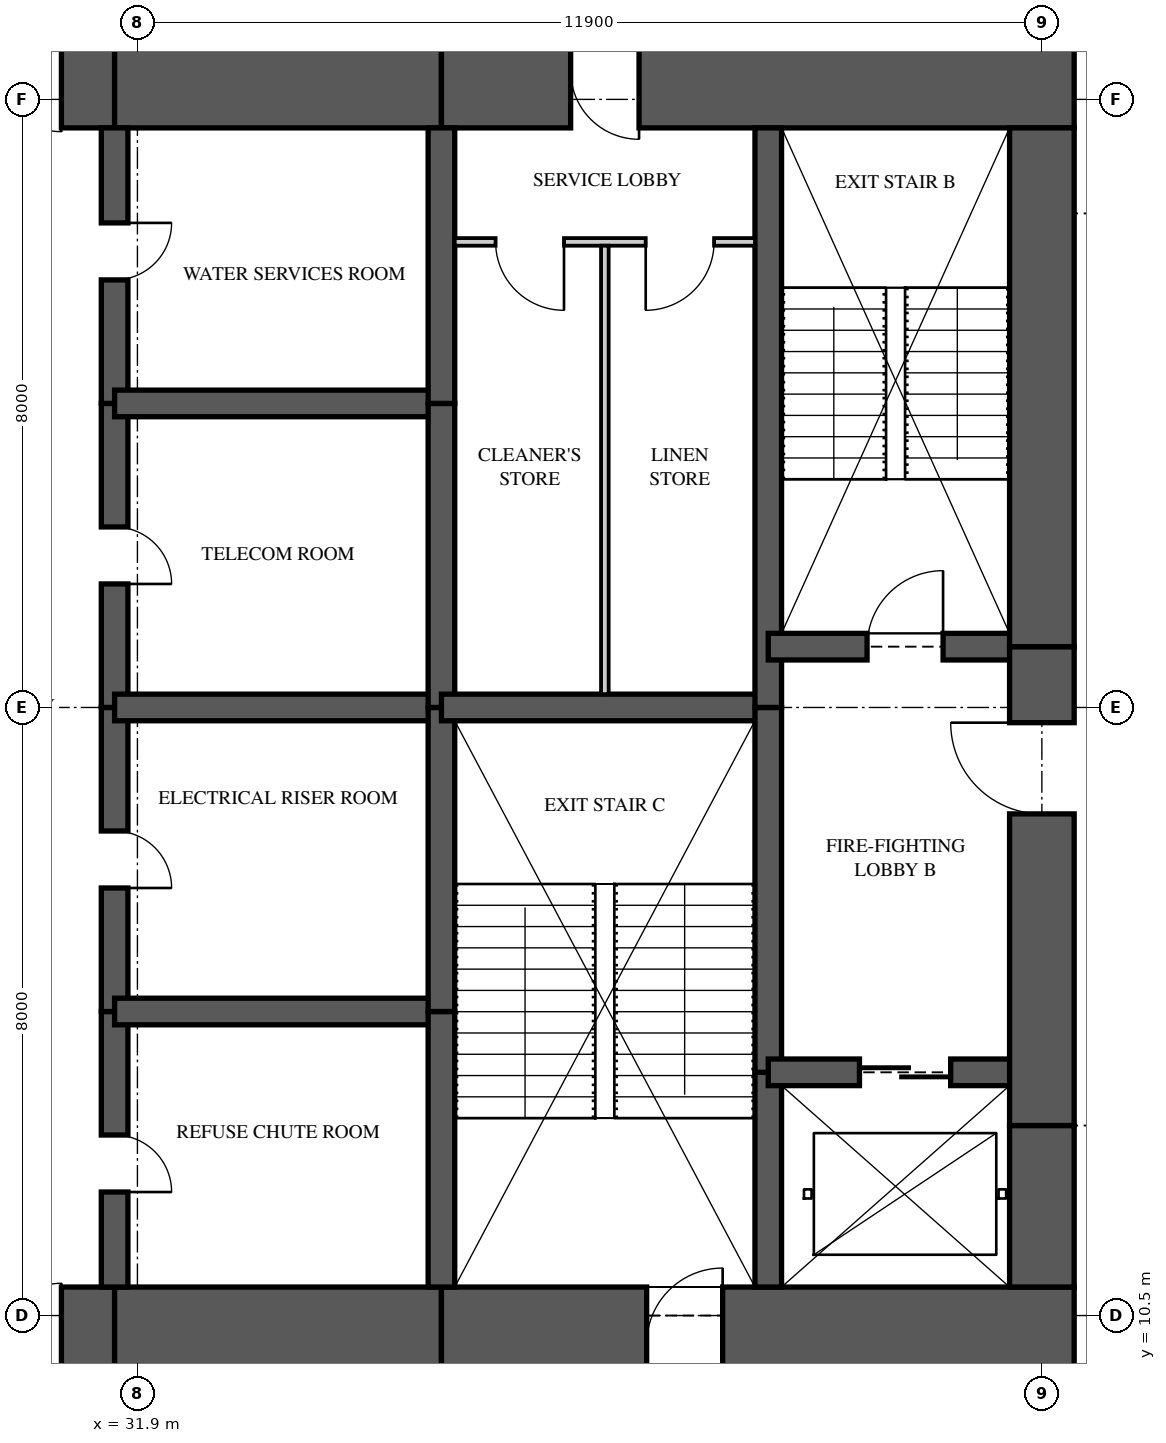
"""IFC4 building model, lengths in metres.
Left out: names, types, materials, properties, quantities, classifications, styles, units other than length and angle.
Written with IfcOpenShell. Run it as: python <this file> out.ifc"""

import sys

from ifc_helpers import new_model, si_unit, direction, frame, frame_2d, origin, place, context, subcontext, project, spatial, rectangle, extrude, element, fill, save


model = new_model("IFC4")
c1 = context("Model", 3, precision=1e-05, world=origin(), true_north=direction((0.0, 1.0)))
c2 = subcontext(c1, "Body", "Model", "MODEL_VIEW")
j1 = project(units=[si_unit("LENGTHUNIT", "METRE"), si_unit("PLANEANGLEUNIT", "RADIAN")], contexts=[c1])
p1 = place(None, origin())
s1 = spatial("IfcSite", under=j1, at=p1, CompositionType="ELEMENT")
p2 = place(p1, origin())
s2 = spatial("IfcBuilding", under=s1, at=p2, CompositionType="ELEMENT")
p3 = place(p2, frame((0.0, 0.0, 91.45)))
s3 = spatial("IfcBuildingStorey", under=s2, at=p3, CompositionType="ELEMENT", Elevation=91.45)
p4 = place(p3, frame((26.0, 10.125, 0.0), z_axis=(0.0, 0.0, 1.0), x_axis=(1.0, 0.0, 0.0)))
e1 = element("IfcWall", 1, at=p4, inside=s3, PredefinedType="SHEAR", context=c2, shape_type="SweptSolid", body=[
    extrude(rectangle(XDim=5.6, YDim=1.5, at=frame_2d((2.8, 0.0))), origin(), (0.0, 0.0, 1.0), 3.35),
])
p5 = place(p4, frame((3.3, 0.0, 0.0)))
e2 = element("IfcOpeningElement", 2, at=p5, cuts=e1, PredefinedType="OPENING", context=c2, shape_type="SweptSolid", body=[
    extrude(rectangle(XDim=1.6, YDim=2.1, at=frame_2d((0.8, 1.05))), frame((0.0, 0.76, 0.0), z_axis=(0.0, -1.0, 0.0), x_axis=(1.0, 0.0, 0.0)), (0.0, 0.0, 1.0), 1.52),
])
p6 = place(p3, frame((31.6, 10.125, 0.0), z_axis=(0.0, 0.0, 1.0), x_axis=(1.0, 0.0, 0.0)))
e3 = element("IfcWall", 3, at=p6, inside=s3, PredefinedType="SHEAR", context=c2, shape_type="SweptSolid", body=[
    extrude(rectangle(XDim=4.3, YDim=1.5, at=frame_2d((2.15, 0.0))), origin(), (0.0, 0.0, 1.0), 3.35),
])
p7 = place(p3, frame((35.9, 10.125, 0.0), z_axis=(0.0, 0.0, 1.0), x_axis=(1.0, 0.0, 0.0)))
e4 = element("IfcWall", 4, at=p7, inside=s3, PredefinedType="SHEAR", context=c2, shape_type="SweptSolid", body=[
    extrude(rectangle(XDim=8.325, YDim=1.5, at=frame_2d((4.163, 0.0))), origin(), (0.0, 0.0, 1.0), 3.35),
])
p8 = place(p7, frame((2.7, 0.0, 0.0)))
e5 = element("IfcOpeningElement", 5, at=p8, cuts=e4, PredefinedType="OPENING", context=c2, shape_type="SweptSolid", body=[
    extrude(rectangle(XDim=1.0, YDim=2.1, at=frame_2d((0.5, 1.05))), frame((0.0, 0.76, 0.0), z_axis=(0.0, -1.0, 0.0), x_axis=(1.0, 0.0, 0.0)), (0.0, 0.0, 1.0), 1.52),
])
p9 = place(p3, frame((44.225, 26.875, 0.0), z_axis=(0.0, 0.0, 1.0), x_axis=(-1.0, 0.0, 0.0)))
e6 = element("IfcWall", 6, at=p9, inside=s3, PredefinedType="SHEAR", context=c2, shape_type="SweptSolid", body=[
    extrude(rectangle(XDim=8.325, YDim=1.5, at=frame_2d((4.163, 0.0))), origin(), (0.0, 0.0, 1.0), 3.35),
])
p10 = place(p9, frame((5.725, 0.0, 0.0)))
e7 = element("IfcOpeningElement", 7, at=p10, cuts=e6, PredefinedType="OPENING", context=c2, shape_type="SweptSolid", body=[
    extrude(rectangle(XDim=0.9, YDim=2.1, at=frame_2d((0.45, 1.05))), frame((0.0, 0.76, 0.0), z_axis=(0.0, -1.0, 0.0), x_axis=(1.0, 0.0, 0.0)), (0.0, 0.0, 1.0), 1.52),
])
p11 = place(p3, frame((35.9, 26.875, 0.0), z_axis=(0.0, 0.0, 1.0), x_axis=(-1.0, 0.0, 0.0)))
e8 = element("IfcWall", 8, at=p11, inside=s3, PredefinedType="SHEAR", context=c2, shape_type="SweptSolid", body=[
    extrude(rectangle(XDim=4.3, YDim=1.5, at=frame_2d((2.15, 0.0))), origin(), (0.0, 0.0, 1.0), 3.35),
])
p12 = place(p3, frame((31.6, 26.875, 0.0), z_axis=(0.0, 0.0, 1.0), x_axis=(-1.0, 0.0, 0.0)))
e9 = element("IfcWall", 9, at=p12, inside=s3, PredefinedType="SHEAR", context=c2, shape_type="SweptSolid", body=[
    extrude(rectangle(XDim=5.6, YDim=1.5, at=frame_2d((2.8, 0.0))), origin(), (0.0, 0.0, 1.0), 3.35),
])
p13 = place(p12, frame((0.7, 0.0, 0.0)))
e10 = element("IfcOpeningElement", 10, at=p13, cuts=e9, PredefinedType="OPENING", context=c2, shape_type="SweptSolid", body=[
    extrude(rectangle(XDim=1.6, YDim=2.1, at=frame_2d((0.8, 1.05))), frame((0.0, 0.76, 0.0), z_axis=(0.0, -1.0, 0.0), x_axis=(1.0, 0.0, 0.0)), (0.0, 0.0, 1.0), 1.52),
])
p14 = place(p3, frame((43.8, 10.875, 0.0), z_axis=(0.0, 0.0, 1.0), x_axis=(0.0, 1.0, 0.0)))
e11 = element("IfcWall", 11, at=p14, inside=s3, PredefinedType="SHEAR", context=c2, shape_type="SweptSolid", body=[
    extrude(rectangle(XDim=2.125, YDim=0.85, at=frame_2d((1.062, 0.0))), origin(), (0.0, 0.0, 1.0), 3.35),
])
p15 = place(p3, frame((43.8, 13.0, 0.0), z_axis=(0.0, 0.0, 1.0), x_axis=(0.0, 1.0, 0.0)))
e12 = element("IfcWall", 12, at=p15, inside=s3, PredefinedType="SHEAR", context=c2, shape_type="SweptSolid", body=[
    extrude(rectangle(XDim=6.3, YDim=0.85, at=frame_2d((3.15, 0.0))), origin(), (0.0, 0.0, 1.0), 3.35),
])
p16 = place(p15, frame((4.1, 0.0, 0.0)))
e13 = element("IfcOpeningElement", 13, at=p16, cuts=e12, PredefinedType="OPENING", context=c2, shape_type="SweptSolid", body=[
    extrude(rectangle(XDim=1.2, YDim=2.2, at=frame_2d((0.6, 1.1))), frame((0.0, 0.435, 0.0), z_axis=(0.0, -1.0, 0.0), x_axis=(1.0, 0.0, 0.0)), (0.0, 0.0, 1.0), 0.87),
])
p17 = place(p3, frame((43.8, 19.3, 0.0), z_axis=(0.0, 0.0, 1.0), x_axis=(0.0, 1.0, 0.0)))
e14 = element("IfcWall", 14, at=p17, inside=s3, PredefinedType="SHEAR", context=c2, shape_type="SweptSolid", body=[
    extrude(rectangle(XDim=6.825, YDim=0.85, at=frame_2d((3.413, 0.0))), origin(), (0.0, 0.0, 1.0), 3.35),
])
p18 = place(p3, frame((31.6, 10.875, 0.0), z_axis=(0.0, 0.0, 1.0), x_axis=(0.0, 1.0, 0.0)))
e15 = element("IfcWall", 15, at=p18, inside=s3, PredefinedType="SHEAR", context=c2, shape_type="SweptSolid", body=[
    extrude(rectangle(XDim=3.625, YDim=0.35, at=frame_2d((1.812, 0.0))), origin(), (0.0, 0.0, 1.0), 3.35),
])
p19 = place(p18, frame((1.25, 0.0, 0.0)))
e16 = element("IfcOpeningElement", 16, at=p19, cuts=e15, PredefinedType="OPENING", context=c2, shape_type="SweptSolid", body=[
    extrude(rectangle(XDim=0.75, YDim=2.1, at=frame_2d((0.375, 1.05))), frame((0.0, 0.185, 0.0), z_axis=(0.0, -1.0, 0.0), x_axis=(1.0, 0.0, 0.0)), (0.0, 0.0, 1.0), 0.37),
])
p20 = place(p3, frame((31.6, 14.5, 0.0), z_axis=(0.0, 0.0, 1.0), x_axis=(0.0, 1.0, 0.0)))
e17 = element("IfcWall", 17, at=p20, inside=s3, PredefinedType="SHEAR", context=c2, shape_type="SweptSolid", body=[
    extrude(rectangle(XDim=4.0, YDim=0.35, at=frame_2d((2.0, 0.0))), origin(), (0.0, 0.0, 1.0), 3.35),
])
p21 = place(p20, frame((1.625, 0.0, 0.0)))
e18 = element("IfcOpeningElement", 18, at=p21, cuts=e17, PredefinedType="OPENING", context=c2, shape_type="SweptSolid", body=[
    extrude(rectangle(XDim=0.75, YDim=2.1, at=frame_2d((0.375, 1.05))), frame((0.0, 0.185, 0.0), z_axis=(0.0, -1.0, 0.0), x_axis=(1.0, 0.0, 0.0)), (0.0, 0.0, 1.0), 0.37),
])
p22 = place(p3, frame((31.6, 18.5, 0.0), z_axis=(0.0, 0.0, 1.0), x_axis=(0.0, 1.0, 0.0)))
e19 = element("IfcWall", 19, at=p22, inside=s3, PredefinedType="SHEAR", context=c2, shape_type="SweptSolid", body=[
    extrude(rectangle(XDim=4.0, YDim=0.35, at=frame_2d((2.0, 0.0))), origin(), (0.0, 0.0, 1.0), 3.35),
])
p23 = place(p22, frame((1.625, 0.0, 0.0)))
e20 = element("IfcOpeningElement", 20, at=p23, cuts=e19, PredefinedType="OPENING", context=c2, shape_type="SweptSolid", body=[
    extrude(rectangle(XDim=0.75, YDim=2.1, at=frame_2d((0.375, 1.05))), frame((0.0, 0.185, 0.0), z_axis=(0.0, -1.0, 0.0), x_axis=(1.0, 0.0, 0.0)), (0.0, 0.0, 1.0), 0.37),
])
p24 = place(p3, frame((31.6, 22.5, 0.0), z_axis=(0.0, 0.0, 1.0), x_axis=(0.0, 1.0, 0.0)))
e21 = element("IfcWall", 21, at=p24, inside=s3, PredefinedType="SHEAR", context=c2, shape_type="SweptSolid", body=[
    extrude(rectangle(XDim=3.625, YDim=0.35, at=frame_2d((1.812, 0.0))), origin(), (0.0, 0.0, 1.0), 3.35),
])
p25 = place(p24, frame((1.625, 0.0, 0.0)))
e22 = element("IfcOpeningElement", 22, at=p25, cuts=e21, PredefinedType="OPENING", context=c2, shape_type="SweptSolid", body=[
    extrude(rectangle(XDim=0.75, YDim=2.1, at=frame_2d((0.375, 1.05))), frame((0.0, 0.185, 0.0), z_axis=(0.0, -1.0, 0.0), x_axis=(1.0, 0.0, 0.0)), (0.0, 0.0, 1.0), 0.37),
])
p26 = place(p3, frame((35.9, 10.875, 0.0), z_axis=(0.0, 0.0, 1.0), x_axis=(0.0, 1.0, 0.0)))
e23 = element("IfcWall", 23, at=p26, inside=s3, PredefinedType="SHEAR", context=c2, shape_type="SweptSolid", body=[
    extrude(rectangle(XDim=3.625, YDim=0.35, at=frame_2d((1.812, 0.0))), origin(), (0.0, 0.0, 1.0), 3.35),
])
for number, where, z_axis, x_axis in (
    (24, (35.9, 14.5, 0.0), (0.0, 0.0, 1.0), (0.0, 1.0, 0.0)),
    (25, (35.9, 18.5, 0.0), (0.0, 0.0, 1.0), (0.0, 1.0, 0.0)),
):
    element("IfcWall", number, at=place(p3, frame(where, z_axis=z_axis, x_axis=x_axis)), inside=s3, PredefinedType="SHEAR", context=c2, shape_type="SweptSolid", body=[
        extrude(rectangle(XDim=4.0, YDim=0.35, at=frame_2d((2.0, 0.0))), origin(), (0.0, 0.0, 1.0), 3.35),
    ])
p27 = place(p3, frame((35.9, 22.5, 0.0), z_axis=(0.0, 0.0, 1.0), x_axis=(0.0, 1.0, 0.0)))
e26 = element("IfcWall", 26, at=p27, inside=s3, PredefinedType="SHEAR", context=c2, shape_type="SweptSolid", body=[
    extrude(rectangle(XDim=3.625, YDim=0.35, at=frame_2d((1.812, 0.0))), origin(), (0.0, 0.0, 1.0), 3.35),
])
p28 = place(p3, frame((40.2, 10.875, 0.0), z_axis=(0.0, 0.0, 1.0), x_axis=(0.0, 1.0, 0.0)))
e27 = element("IfcWall", 27, at=p28, inside=s3, PredefinedType="SHEAR", context=c2, shape_type="SweptSolid", body=[
    extrude(rectangle(XDim=2.825, YDim=0.35, at=frame_2d((1.413, 0.0))), origin(), (0.0, 0.0, 1.0), 3.35),
])
p29 = place(p3, frame((40.2, 13.7, 0.0), z_axis=(0.0, 0.0, 1.0), x_axis=(0.0, 1.0, 0.0)))
e28 = element("IfcWall", 28, at=p29, inside=s3, PredefinedType="SHEAR", context=c2, shape_type="SweptSolid", body=[
    extrude(rectangle(XDim=4.8, YDim=0.35, at=frame_2d((2.4, 0.0))), origin(), (0.0, 0.0, 1.0), 3.35),
])
p30 = place(p3, frame((40.2, 18.5, 0.0), z_axis=(0.0, 0.0, 1.0), x_axis=(0.0, 1.0, 0.0)))
e29 = element("IfcWall", 29, at=p30, inside=s3, PredefinedType="SHEAR", context=c2, shape_type="SweptSolid", body=[
    extrude(rectangle(XDim=7.625, YDim=0.35, at=frame_2d((3.812, 0.0))), origin(), (0.0, 0.0, 1.0), 3.35),
])
for number, where, z_axis, x_axis in (
    (30, (31.6, 14.5, 0.0), (0.0, 0.0, 1.0), (1.0, 0.0, 0.0)),
    (31, (31.6, 18.5, 0.0), (0.0, 0.0, 1.0), (1.0, 0.0, 0.0)),
    (32, (31.6, 22.5, 0.0), (0.0, 0.0, 1.0), (1.0, 0.0, 0.0)),
):
    element("IfcWall", number, at=place(p3, frame(where, z_axis=z_axis, x_axis=x_axis)), inside=s3, PredefinedType="SHEAR", context=c2, shape_type="SweptSolid", body=[
        extrude(rectangle(XDim=4.3, YDim=0.35, at=frame_2d((2.15, 0.0))), origin(), (0.0, 0.0, 1.0), 3.35),
    ])
p31 = place(p3, frame((35.9, 18.5, 0.0), z_axis=(0.0, 0.0, 1.0), x_axis=(1.0, 0.0, 0.0)))
e33 = element("IfcWall", 33, at=p31, inside=s3, PredefinedType="SHEAR", context=c2, shape_type="SweptSolid", body=[
    extrude(rectangle(XDim=4.3, YDim=0.35, at=frame_2d((2.15, 0.0))), origin(), (0.0, 0.0, 1.0), 3.35),
])
p32 = place(p3, frame((40.2, 13.7, 0.0), z_axis=(0.0, 0.0, 1.0), x_axis=(1.0, 0.0, 0.0)))
e34 = element("IfcWall", 34, at=p32, inside=s3, PredefinedType="SHEAR", context=c2, shape_type="SweptSolid", body=[
    extrude(rectangle(XDim=3.6, YDim=0.35, at=frame_2d((1.8, 0.0))), origin(), (0.0, 0.0, 1.0), 3.35),
])
p33 = place(p32, frame((1.2, 0.0, 0.0)))
e35 = element("IfcOpeningElement", 35, at=p33, cuts=e34, PredefinedType="OPENING", context=c2, shape_type="SweptSolid", body=[
    extrude(rectangle(XDim=1.2, YDim=2.1, at=frame_2d((0.6, 1.05))), frame((0.0, 0.185, 0.0), z_axis=(0.0, -1.0, 0.0), x_axis=(1.0, 0.0, 0.0)), (0.0, 0.0, 1.0), 0.37),
])
p34 = place(p3, frame((40.2, 19.3, 0.0), z_axis=(0.0, 0.0, 1.0), x_axis=(1.0, 0.0, 0.0)))
e36 = element("IfcWall", 36, at=p34, inside=s3, PredefinedType="SHEAR", context=c2, shape_type="SweptSolid", body=[
    extrude(rectangle(XDim=3.6, YDim=0.35, at=frame_2d((1.8, 0.0))), origin(), (0.0, 0.0, 1.0), 3.35),
])
p35 = place(p34, frame((1.3, 0.0, 0.0)))
e37 = element("IfcOpeningElement", 37, at=p35, cuts=e36, PredefinedType="OPENING", context=c2, shape_type="SweptSolid", body=[
    extrude(rectangle(XDim=1.0, YDim=2.1, at=frame_2d((0.5, 1.05))), frame((0.0, 0.185, 0.0), z_axis=(0.0, -1.0, 0.0), x_axis=(1.0, 0.0, 0.0)), (0.0, 0.0, 1.0), 0.37),
])
p36 = place(p3, frame((36.075, 24.625, 0.0), z_axis=(0.0, 0.0, 1.0), x_axis=(1.0, 0.0, 0.0)))
e38 = element("IfcWall", 38, at=p36, inside=s3, PredefinedType="PARTITIONING", context=c2, shape_type="SweptSolid", body=[
    extrude(rectangle(XDim=3.95, YDim=0.1, at=frame_2d((1.975, 0.0))), origin(), (0.0, 0.0, 1.0), 3.11),
])
p37 = place(p36, frame((0.538, 0.0, 0.0)))
e39 = element("IfcOpeningElement", 39, at=p37, cuts=e38, PredefinedType="OPENING", context=c2, shape_type="SweptSolid", body=[
    extrude(rectangle(XDim=0.9, YDim=2.1, at=frame_2d((0.45, 1.05))), frame((0.0, 0.06, 0.0), z_axis=(0.0, -1.0, 0.0), x_axis=(1.0, 0.0, 0.0)), (0.0, 0.0, 1.0), 0.12),
])
p38 = place(p36, frame((2.512, 0.0, 0.0)))
e40 = element("IfcOpeningElement", 40, at=p38, cuts=e38, PredefinedType="OPENING", context=c2, shape_type="SweptSolid", body=[
    extrude(rectangle(XDim=0.9, YDim=2.1, at=frame_2d((0.45, 1.05))), frame((0.0, 0.06, 0.0), z_axis=(0.0, -1.0, 0.0), x_axis=(1.0, 0.0, 0.0)), (0.0, 0.0, 1.0), 0.12),
])
p39 = place(p3, frame((38.05, 18.675, 0.0), z_axis=(0.0, 0.0, 1.0), x_axis=(0.0, 1.0, 0.0)))
e41 = element("IfcWall", 41, at=p39, inside=s3, PredefinedType="PARTITIONING", context=c2, shape_type="SweptSolid", body=[
    extrude(rectangle(XDim=5.9, YDim=0.1, at=frame_2d((2.95, 0.0))), origin(), (0.0, 0.0, 1.0), 3.11),
])
p40 = place(p37, frame((0.9, 0.0, 0.0), z_axis=(0.0, 0.0, 1.0), x_axis=(-1.0, 0.0, 0.0)))
e42 = element("IfcDoor", 42, at=p40, inside=s3, OperationType="SINGLE_SWING_LEFT", PredefinedType="DOOR", context=c2, shape_type="SweptSolid", body=[
    extrude(rectangle(XDim=0.9, YDim=2.1, at=frame_2d((0.45, 1.05))), frame((0.0, 0.025, 0.0), z_axis=(0.0, -1.0, 0.0), x_axis=(1.0, 0.0, 0.0)), (0.0, 0.0, 1.0), 0.05),
])
fill(e39, e42)
p41 = place(p38, frame((0.9, 0.0, 0.0), z_axis=(0.0, 0.0, 1.0), x_axis=(-1.0, 0.0, 0.0)))
e43 = element("IfcDoor", 43, at=p41, inside=s3, OperationType="SINGLE_SWING_RIGHT", PredefinedType="DOOR", context=c2, shape_type="SweptSolid", body=[
    extrude(rectangle(XDim=0.9, YDim=2.1, at=frame_2d((0.45, 1.05))), frame((0.0, 0.025, 0.0), z_axis=(0.0, -1.0, 0.0), x_axis=(1.0, 0.0, 0.0)), (0.0, 0.0, 1.0), 0.05),
])
fill(e40, e43)
p42 = place(p35, origin())
e44 = element("IfcDoor", 44, at=p42, inside=s3, OperationType="SINGLE_SWING_RIGHT", PredefinedType="DOOR", context=c2, shape_type="SweptSolid", body=[
    extrude(rectangle(XDim=1.0, YDim=2.1, at=frame_2d((0.5, 1.05))), frame((0.0, 0.025, 0.0), z_axis=(0.0, -1.0, 0.0), x_axis=(1.0, 0.0, 0.0)), (0.0, 0.0, 1.0), 0.05),
])
fill(e37, e44)
p43 = place(p16, origin())
e45 = element("IfcDoor", 45, at=p43, inside=s3, OperationType="SINGLE_SWING_RIGHT", PredefinedType="DOOR", context=c2, shape_type="SweptSolid", body=[
    extrude(rectangle(XDim=1.2, YDim=2.2, at=frame_2d((0.6, 1.1))), frame((0.0, 0.025, 0.0), z_axis=(0.0, -1.0, 0.0), x_axis=(1.0, 0.0, 0.0)), (0.0, 0.0, 1.0), 0.05),
])
fill(e13, e45)
p44 = place(p33, origin())
e46 = element("IfcDoor", 46, at=p44, inside=s3, OperationType="SLIDING_TO_LEFT", PredefinedType="DOOR", context=c2, shape_type="SweptSolid", body=[
    extrude(rectangle(XDim=1.2, YDim=2.1, at=frame_2d((0.6, 1.05))), frame((0.0, 0.025, 0.0), z_axis=(0.0, -1.0, 0.0), x_axis=(1.0, 0.0, 0.0)), (0.0, 0.0, 1.0), 0.05),
])
fill(e35, e46)
p45 = place(p5, origin())
e47 = element("IfcDoor", 47, at=p45, inside=s3, OperationType="DOUBLE_DOOR_SINGLE_SWING", PredefinedType="DOOR", context=c2, shape_type="SweptSolid", body=[
    extrude(rectangle(XDim=1.6, YDim=2.1, at=frame_2d((0.8, 1.05))), frame((0.0, 0.025, 0.0), z_axis=(0.0, -1.0, 0.0), x_axis=(1.0, 0.0, 0.0)), (0.0, 0.0, 1.0), 0.05),
])
fill(e2, e47)
p46 = place(p13, origin())
e48 = element("IfcDoor", 48, at=p46, inside=s3, OperationType="DOUBLE_DOOR_SINGLE_SWING", PredefinedType="DOOR", context=c2, shape_type="SweptSolid", body=[
    extrude(rectangle(XDim=1.6, YDim=2.1, at=frame_2d((0.8, 1.05))), frame((0.0, 0.025, 0.0), z_axis=(0.0, -1.0, 0.0), x_axis=(1.0, 0.0, 0.0)), (0.0, 0.0, 1.0), 0.05),
])
fill(e10, e48)
p47 = place(p19, frame((0.75, 0.0, 0.0), z_axis=(0.0, 0.0, 1.0), x_axis=(-1.0, 0.0, 0.0)))
e49 = element("IfcDoor", 49, at=p47, inside=s3, OperationType="SINGLE_SWING_RIGHT", PredefinedType="DOOR", context=c2, shape_type="SweptSolid", body=[
    extrude(rectangle(XDim=0.75, YDim=2.1, at=frame_2d((0.375, 1.05))), frame((0.0, 0.025, 0.0), z_axis=(0.0, -1.0, 0.0), x_axis=(1.0, 0.0, 0.0)), (0.0, 0.0, 1.0), 0.05),
])
fill(e16, e49)
p48 = place(p21, frame((0.75, 0.0, 0.0), z_axis=(0.0, 0.0, 1.0), x_axis=(-1.0, 0.0, 0.0)))
e50 = element("IfcDoor", 50, at=p48, inside=s3, OperationType="SINGLE_SWING_RIGHT", PredefinedType="DOOR", context=c2, shape_type="SweptSolid", body=[
    extrude(rectangle(XDim=0.75, YDim=2.1, at=frame_2d((0.375, 1.05))), frame((0.0, 0.025, 0.0), z_axis=(0.0, -1.0, 0.0), x_axis=(1.0, 0.0, 0.0)), (0.0, 0.0, 1.0), 0.05),
])
fill(e18, e50)
p49 = place(p23, frame((0.75, 0.0, 0.0), z_axis=(0.0, 0.0, 1.0), x_axis=(-1.0, 0.0, 0.0)))
e51 = element("IfcDoor", 51, at=p49, inside=s3, OperationType="SINGLE_SWING_RIGHT", PredefinedType="DOOR", context=c2, shape_type="SweptSolid", body=[
    extrude(rectangle(XDim=0.75, YDim=2.1, at=frame_2d((0.375, 1.05))), frame((0.0, 0.025, 0.0), z_axis=(0.0, -1.0, 0.0), x_axis=(1.0, 0.0, 0.0)), (0.0, 0.0, 1.0), 0.05),
])
fill(e20, e51)
p50 = place(p25, frame((0.75, 0.0, 0.0), z_axis=(0.0, 0.0, 1.0), x_axis=(-1.0, 0.0, 0.0)))
e52 = element("IfcDoor", 52, at=p50, inside=s3, OperationType="SINGLE_SWING_LEFT", PredefinedType="DOOR", context=c2, shape_type="SweptSolid", body=[
    extrude(rectangle(XDim=0.75, YDim=2.1, at=frame_2d((0.375, 1.05))), frame((0.0, 0.025, 0.0), z_axis=(0.0, -1.0, 0.0), x_axis=(1.0, 0.0, 0.0)), (0.0, 0.0, 1.0), 0.05),
])
fill(e22, e52)
p51 = place(p8, origin())
e53 = element("IfcDoor", 53, at=p51, inside=s3, OperationType="SINGLE_SWING_RIGHT", PredefinedType="DOOR", context=c2, shape_type="SweptSolid", body=[
    extrude(rectangle(XDim=1.0, YDim=2.1, at=frame_2d((0.5, 1.05))), frame((0.0, 0.025, 0.0), z_axis=(0.0, -1.0, 0.0), x_axis=(1.0, 0.0, 0.0)), (0.0, 0.0, 1.0), 0.05),
])
fill(e5, e53)
p52 = place(p10, origin())
e54 = element("IfcDoor", 54, at=p52, inside=s3, OperationType="SINGLE_SWING_LEFT", PredefinedType="DOOR", context=c2, shape_type="SweptSolid", body=[
    extrude(rectangle(XDim=0.9, YDim=2.1, at=frame_2d((0.45, 1.05))), frame((0.0, 0.47, 0.0), z_axis=(0.0, -1.0, 0.0), x_axis=(1.0, 0.0, 0.0)), (0.0, 0.0, 1.0), 0.8),
])
fill(e7, e54)
save(model, sys.argv[1])
